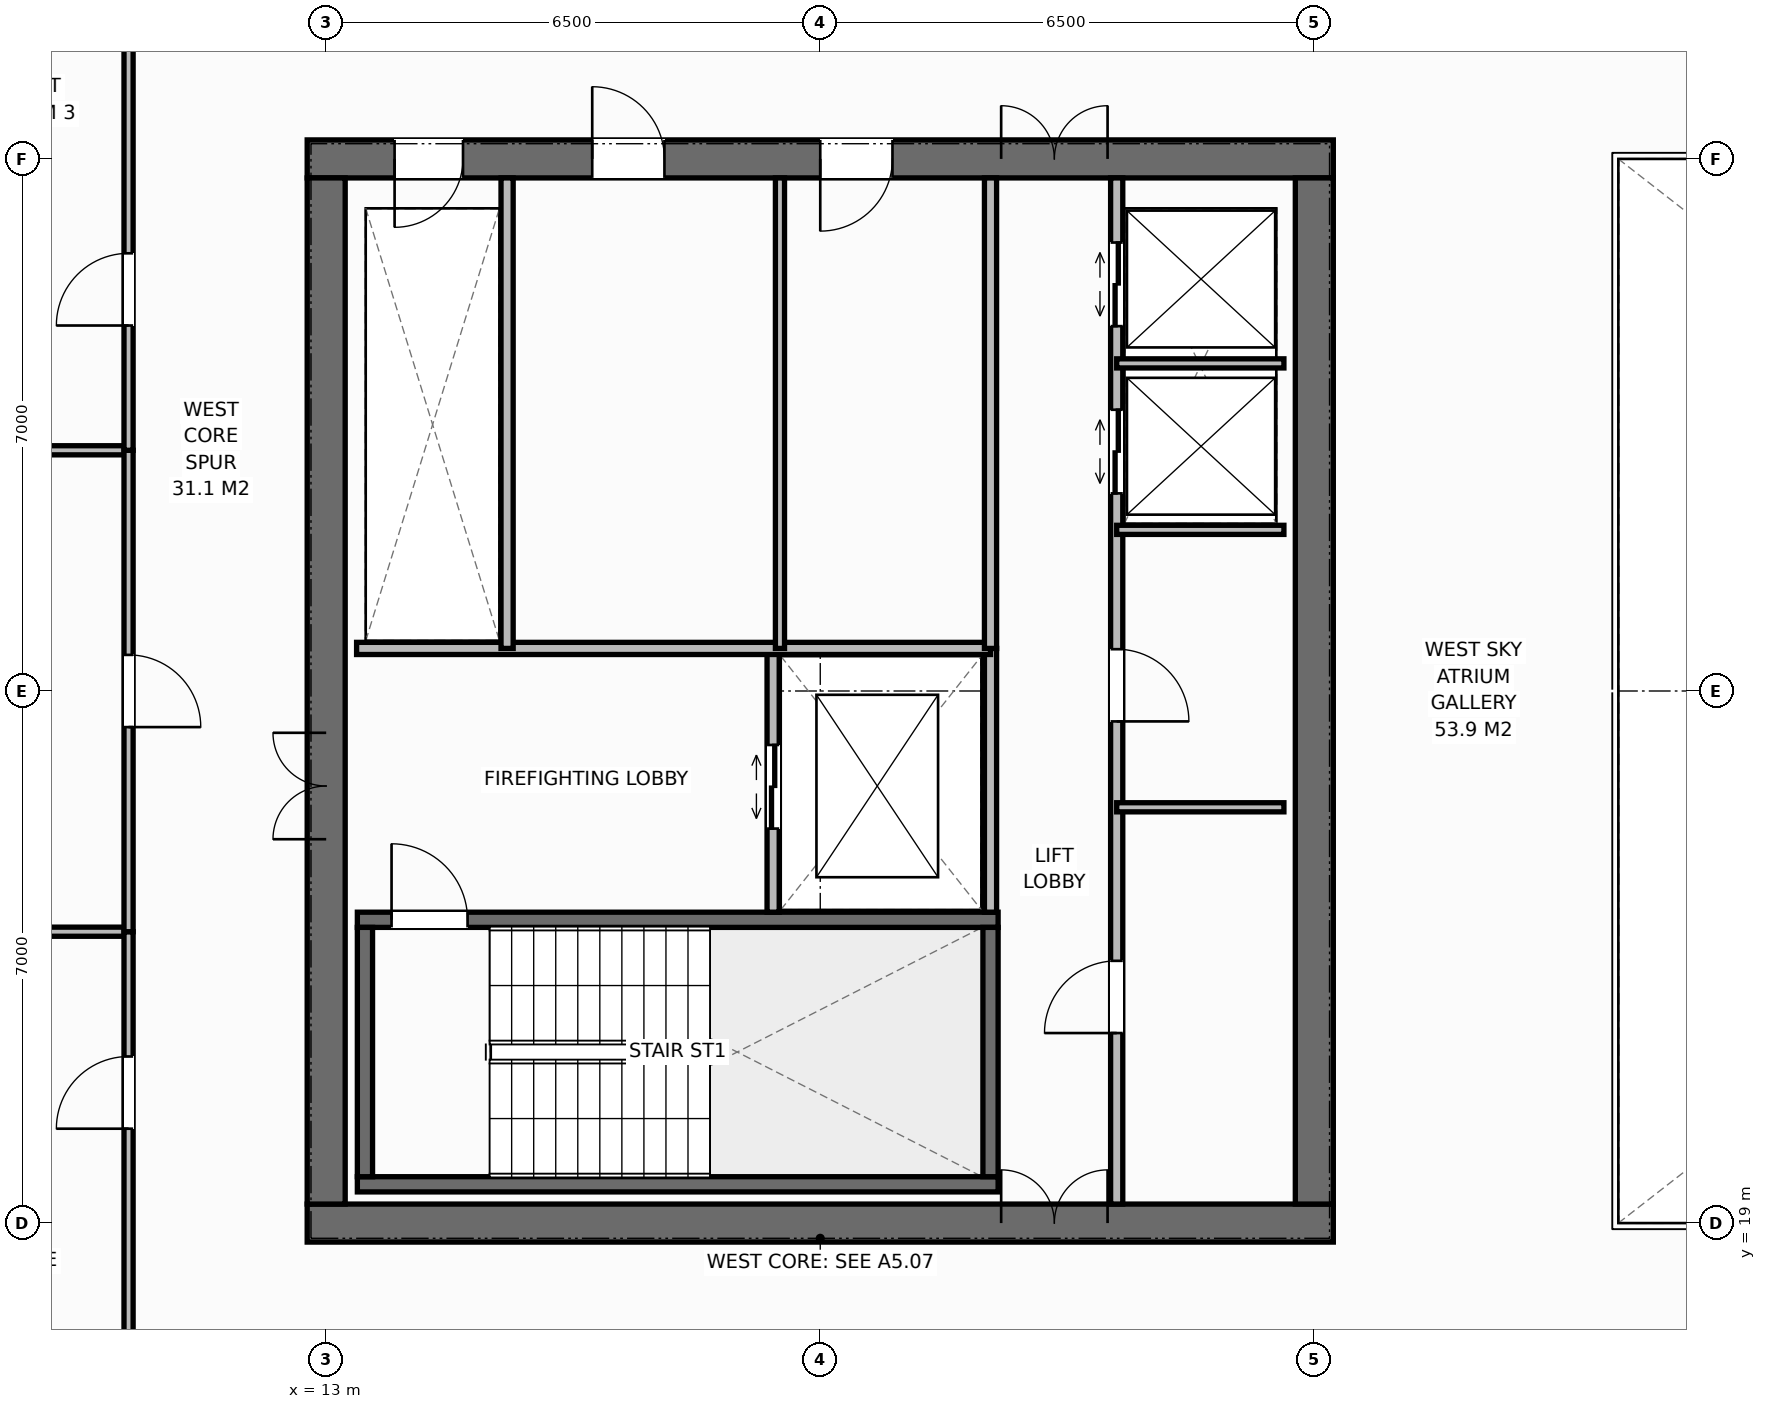
"""IFC4 building model, lengths in metres.
Left out: names, types, materials, properties, quantities, classifications, styles, units other than length and angle.
Written with IfcOpenShell. Run it as: python <this file> out.ifc"""

import sys

from ifc_helpers import new_model, si_unit, direction, frame, frame_2d, origin, place, context, subcontext, project, spatial, rectangle, extrude, element, fill, save


model = new_model("IFC4")
c1 = context("Model", 3, precision=1e-05, world=origin(), true_north=direction((0.0, 1.0)))
c2 = subcontext(c1, "Body", "Model", "MODEL_VIEW")
j1 = project(units=[si_unit("LENGTHUNIT", "METRE"), si_unit("PLANEANGLEUNIT", "RADIAN")], contexts=[c1])
p1 = place(None, origin())
s1 = spatial("IfcSite", under=j1, at=p1, CompositionType="ELEMENT")
p2 = place(p1, origin())
s2 = spatial("IfcBuilding", under=s1, at=p2, CompositionType="ELEMENT")
p3 = place(p2, frame((0.0, 0.0, 229.0)))
s3 = spatial("IfcBuildingStorey", under=s2, at=p3, CompositionType="ELEMENT", Elevation=229.0)
p4 = place(p3, frame((12.75, 19.0, 0.0), z_axis=(0.0, 0.0, 1.0), x_axis=(1.0, 0.0, 0.0)))
e1 = element("IfcWall", 1, at=p4, inside=s3, PredefinedType="SHEAR", context=c2, shape_type="SweptSolid", body=[
    extrude(rectangle(XDim=13.5, YDim=0.5, at=frame_2d((6.75, 0.0))), origin(), (0.0, 0.0, 1.0), 3.8),
])
p5 = place(p4, frame((9.13, 0.0, 0.0)))
e2 = element("IfcOpeningElement", 2, at=p5, cuts=e1, PredefinedType="OPENING", context=c2, shape_type="SweptSolid", body=[
    extrude(rectangle(XDim=1.4, YDim=2.2, at=frame_2d((0.7, 1.1))), frame((0.0, 0.26, 0.0), z_axis=(0.0, -1.0, 0.0), x_axis=(1.0, 0.0, 0.0)), (0.0, 0.0, 1.0), 0.52),
])
p6 = place(p3, frame((12.75, 33.0, 0.0), z_axis=(0.0, 0.0, 1.0), x_axis=(1.0, 0.0, 0.0)))
e3 = element("IfcWall", 3, at=p6, inside=s3, PredefinedType="SHEAR", context=c2, shape_type="SweptSolid", body=[
    extrude(rectangle(XDim=13.5, YDim=0.5, at=frame_2d((6.75, 0.0))), origin(), (0.0, 0.0, 1.0), 3.8),
])
p7 = place(p6, frame((1.15, 0.0, 0.0)))
e4 = element("IfcOpeningElement", 4, at=p7, cuts=e3, PredefinedType="OPENING", context=c2, shape_type="SweptSolid", body=[
    extrude(rectangle(XDim=0.9, YDim=2.15, at=frame_2d((0.45, 1.075))), frame((0.0, 0.26, 0.0), z_axis=(0.0, -1.0, 0.0), x_axis=(1.0, 0.0, 0.0)), (0.0, 0.0, 1.0), 0.52),
])
p8 = place(p6, frame((3.75, 0.0, 0.0)))
e5 = element("IfcOpeningElement", 5, at=p8, cuts=e3, PredefinedType="OPENING", context=c2, shape_type="SweptSolid", body=[
    extrude(rectangle(XDim=0.95, YDim=2.15, at=frame_2d((0.475, 1.075))), frame((0.0, 0.26, 0.0), z_axis=(0.0, -1.0, 0.0), x_axis=(1.0, 0.0, 0.0)), (0.0, 0.0, 1.0), 0.52),
])
p9 = place(p6, frame((6.75, 0.0, 0.0)))
e6 = element("IfcOpeningElement", 6, at=p9, cuts=e3, PredefinedType="OPENING", context=c2, shape_type="SweptSolid", body=[
    extrude(rectangle(XDim=0.95, YDim=2.15, at=frame_2d((0.475, 1.075))), frame((0.0, 0.26, 0.0), z_axis=(0.0, -1.0, 0.0), x_axis=(1.0, 0.0, 0.0)), (0.0, 0.0, 1.0), 0.52),
])
p10 = place(p6, frame((9.13, 0.0, 0.0)))
e7 = element("IfcOpeningElement", 7, at=p10, cuts=e3, PredefinedType="OPENING", context=c2, shape_type="SweptSolid", body=[
    extrude(rectangle(XDim=1.4, YDim=2.2, at=frame_2d((0.7, 1.1))), frame((0.0, 0.26, 0.0), z_axis=(0.0, -1.0, 0.0), x_axis=(1.0, 0.0, 0.0)), (0.0, 0.0, 1.0), 0.52),
])
p11 = place(p3, frame((13.0, 19.25, 0.0), z_axis=(0.0, 0.0, 1.0), x_axis=(0.0, 1.0, 0.0)))
e8 = element("IfcWall", 8, at=p11, inside=s3, PredefinedType="SHEAR", context=c2, shape_type="SweptSolid", body=[
    extrude(rectangle(XDim=13.5, YDim=0.5, at=frame_2d((6.75, 0.0))), origin(), (0.0, 0.0, 1.0), 3.8),
])
p12 = place(p11, frame((4.8, 0.0, 0.0)))
e9 = element("IfcOpeningElement", 9, at=p12, cuts=e8, PredefinedType="OPENING", context=c2, shape_type="SweptSolid", body=[
    extrude(rectangle(XDim=1.4, YDim=2.2, at=frame_2d((0.7, 1.1))), frame((0.0, 0.26, 0.0), z_axis=(0.0, -1.0, 0.0), x_axis=(1.0, 0.0, 0.0)), (0.0, 0.0, 1.0), 0.52),
])
p13 = place(p3, frame((26.0, 19.25, 0.0), z_axis=(0.0, 0.0, 1.0), x_axis=(0.0, 1.0, 0.0)))
e10 = element("IfcWall", 10, at=p13, inside=s3, PredefinedType="SHEAR", context=c2, shape_type="SweptSolid", body=[
    extrude(rectangle(XDim=13.5, YDim=0.5, at=frame_2d((6.75, 0.0))), origin(), (0.0, 0.0, 1.0), 3.8),
])
p14 = place(p3, frame((13.41, 19.51, 0.0), z_axis=(0.0, 0.0, 1.0), x_axis=(1.0, 0.0, 0.0)))
e11 = element("IfcWall", 11, at=p14, inside=s3, PredefinedType="SHEAR", context=c2, shape_type="SweptSolid", body=[
    extrude(rectangle(XDim=8.43, YDim=0.2, at=frame_2d((4.215, 0.0))), origin(), (0.0, 0.0, 1.0), 3.8),
])
p15 = place(p3, frame((13.41, 22.99, 0.0), z_axis=(0.0, 0.0, 1.0), x_axis=(1.0, 0.0, 0.0)))
e12 = element("IfcWall", 12, at=p15, inside=s3, PredefinedType="SHEAR", context=c2, shape_type="SweptSolid", body=[
    extrude(rectangle(XDim=8.43, YDim=0.2, at=frame_2d((4.215, 0.0))), origin(), (0.0, 0.0, 1.0), 3.8),
])
p16 = place(p15, frame((0.45, 0.0, 0.0)))
e13 = element("IfcOpeningElement", 13, at=p16, cuts=e12, PredefinedType="OPENING", context=c2, shape_type="SweptSolid", body=[
    extrude(rectangle(XDim=1.0, YDim=2.15, at=frame_2d((0.5, 1.075))), frame((0.0, 0.11, 0.0), z_axis=(0.0, -1.0, 0.0), x_axis=(1.0, 0.0, 0.0)), (0.0, 0.0, 1.0), 0.22),
])
for number, where, z_axis, x_axis in (
    (14, (13.51, 19.61, 0.0), (0.0, 0.0, 1.0), (0.0, 1.0, 0.0)),
    (15, (21.74, 19.61, 0.0), (0.0, 0.0, 1.0), (0.0, 1.0, 0.0)),
):
    element("IfcWall", number, at=place(p3, frame(where, z_axis=z_axis, x_axis=x_axis)), inside=s3, PredefinedType="SHEAR", context=c2, shape_type="SweptSolid", body=[
        extrude(rectangle(XDim=3.28, YDim=0.2, at=frame_2d((1.64, 0.0))), origin(), (0.0, 0.0, 1.0), 3.8),
    ])
p17 = place(p3, frame((21.74, 23.09, 0.0), z_axis=(0.0, 0.0, 1.0), x_axis=(0.0, 1.0, 0.0)))
e16 = element("IfcWall", 16, at=p17, inside=s3, PredefinedType="STANDARD", context=c2, shape_type="SweptSolid", body=[
    extrude(rectangle(XDim=3.47, YDim=0.16, at=frame_2d((1.735, 0.0))), origin(), (0.0, 0.0, 1.0), 3.58),
])
p18 = place(p3, frame((18.88, 23.09, 0.0), z_axis=(0.0, 0.0, 1.0), x_axis=(0.0, 1.0, 0.0)))
e17 = element("IfcWall", 17, at=p18, inside=s3, PredefinedType="STANDARD", context=c2, shape_type="SweptSolid", body=[
    extrude(rectangle(XDim=3.47, YDim=0.16, at=frame_2d((1.735, 0.0))), origin(), (0.0, 0.0, 1.0), 3.58),
])
p19 = place(p18, frame((1.1, 0.0, 0.0)))
e18 = element("IfcOpeningElement", 18, at=p19, cuts=e17, PredefinedType="OPENING", context=c2, shape_type="SweptSolid", body=[
    extrude(rectangle(XDim=1.1, YDim=2.2, at=frame_2d((0.55, 1.1))), frame((0.0, 0.09, 0.0), z_axis=(0.0, -1.0, 0.0), x_axis=(1.0, 0.0, 0.0)), (0.0, 0.0, 1.0), 0.18),
])
p20 = place(p3, frame((13.4, 26.56, 0.0), z_axis=(0.0, 0.0, 1.0), x_axis=(1.0, 0.0, 0.0)))
e19 = element("IfcWall", 19, at=p20, inside=s3, PredefinedType="STANDARD", context=c2, shape_type="SweptSolid", body=[
    extrude(rectangle(XDim=8.34, YDim=0.16, at=frame_2d((4.17, 0.0))), origin(), (0.0, 0.0, 1.0), 3.58),
])
p21 = place(p3, frame((15.38, 26.56, 0.0), z_axis=(0.0, 0.0, 1.0), x_axis=(0.0, 1.0, 0.0)))
e20 = element("IfcWall", 20, at=p21, inside=s3, PredefinedType="STANDARD", context=c2, shape_type="SweptSolid", body=[
    extrude(rectangle(XDim=6.19, YDim=0.16, at=frame_2d((3.095, 0.0))), origin(), (0.0, 0.0, 1.0), 3.58),
])
p22 = place(p3, frame((18.97, 26.56, 0.0), z_axis=(0.0, 0.0, 1.0), x_axis=(0.0, 1.0, 0.0)))
e21 = element("IfcWall", 21, at=p22, inside=s3, PredefinedType="PARTITIONING", context=c2, shape_type="SweptSolid", body=[
    extrude(rectangle(XDim=6.19, YDim=0.12, at=frame_2d((3.095, 0.0))), origin(), (0.0, 0.0, 1.0), 3.58),
])
p23 = place(p3, frame((21.74, 26.56, 0.0), z_axis=(0.0, 0.0, 1.0), x_axis=(0.0, 1.0, 0.0)))
e22 = element("IfcWall", 22, at=p23, inside=s3, PredefinedType="STANDARD", context=c2, shape_type="SweptSolid", body=[
    extrude(rectangle(XDim=6.19, YDim=0.16, at=frame_2d((3.095, 0.0))), origin(), (0.0, 0.0, 1.0), 3.58),
])
p24 = place(p3, frame((23.4, 19.25, 0.0), z_axis=(0.0, 0.0, 1.0), x_axis=(0.0, 1.0, 0.0)))
e23 = element("IfcWall", 23, at=p24, inside=s3, PredefinedType="STANDARD", context=c2, shape_type="SweptSolid", body=[
    extrude(rectangle(XDim=13.5, YDim=0.16, at=frame_2d((6.75, 0.0))), origin(), (0.0, 0.0, 1.0), 3.58),
])
p25 = place(p24, frame((2.25, 0.0, 0.0)))
e24 = element("IfcOpeningElement", 24, at=p25, cuts=e23, PredefinedType="OPENING", context=c2, shape_type="SweptSolid", body=[
    extrude(rectangle(XDim=0.95, YDim=2.15, at=frame_2d((0.475, 1.075))), frame((0.0, 0.09, 0.0), z_axis=(0.0, -1.0, 0.0), x_axis=(1.0, 0.0, 0.0)), (0.0, 0.0, 1.0), 0.18),
])
p26 = place(p24, frame((6.35, 0.0, 0.0)))
e25 = element("IfcOpeningElement", 25, at=p26, cuts=e23, PredefinedType="OPENING", context=c2, shape_type="SweptSolid", body=[
    extrude(rectangle(XDim=0.95, YDim=2.15, at=frame_2d((0.475, 1.075))), frame((0.0, 0.09, 0.0), z_axis=(0.0, -1.0, 0.0), x_axis=(1.0, 0.0, 0.0)), (0.0, 0.0, 1.0), 0.18),
])
p27 = place(p24, frame((9.35, 0.0, 0.0)))
e26 = element("IfcOpeningElement", 26, at=p27, cuts=e23, PredefinedType="OPENING", context=c2, shape_type="SweptSolid", body=[
    extrude(rectangle(XDim=1.1, YDim=2.2, at=frame_2d((0.55, 1.1))), frame((0.0, 0.09, 0.0), z_axis=(0.0, -1.0, 0.0), x_axis=(1.0, 0.0, 0.0)), (0.0, 0.0, 1.0), 0.18),
])
p28 = place(p24, frame((11.55, 0.0, 0.0)))
e27 = element("IfcOpeningElement", 27, at=p28, cuts=e23, PredefinedType="OPENING", context=c2, shape_type="SweptSolid", body=[
    extrude(rectangle(XDim=1.1, YDim=2.2, at=frame_2d((0.55, 1.1))), frame((0.0, 0.09, 0.0), z_axis=(0.0, -1.0, 0.0), x_axis=(1.0, 0.0, 0.0)), (0.0, 0.0, 1.0), 0.18),
])
for number, where, z_axis, x_axis in (
    (28, (23.4, 24.47, 0.0), (0.0, 0.0, 1.0), (1.0, 0.0, 0.0)),
    (29, (23.4, 28.12, 0.0), (0.0, 0.0, 1.0), (1.0, 0.0, 0.0)),
    (30, (23.4, 30.31, 0.0), (0.0, 0.0, 1.0), (1.0, 0.0, 0.0)),
):
    element("IfcWall", number, at=place(p3, frame(where, z_axis=z_axis, x_axis=x_axis)), inside=s3, PredefinedType="PARTITIONING", context=c2, shape_type="SweptSolid", body=[
        extrude(rectangle(XDim=2.2, YDim=0.12, at=frame_2d((1.1, 0.0))), origin(), (0.0, 0.0, 1.0), 3.58),
    ])
p29 = place(p3, frame((5.82, 22.833, 0.0), z_axis=(0.0, 0.0, 1.0), x_axis=(1.0, 0.0, 0.0)))
e31 = element("IfcWall", 31, at=p29, inside=s3, PredefinedType="PARTITIONING", context=c2, shape_type="SweptSolid", body=[
    extrude(rectangle(XDim=4.58, YDim=0.12, at=frame_2d((2.29, 0.0))), origin(), (0.0, 0.0, 1.0), 3.58),
])
p30 = place(p3, frame((10.4, 16.5, 0.0), z_axis=(0.0, 0.0, 1.0), x_axis=(0.0, 1.0, 0.0)))
e32 = element("IfcWall", 32, at=p30, inside=s3, PredefinedType="PARTITIONING", context=c2, shape_type="SweptSolid", body=[
    extrude(rectangle(XDim=6.333, YDim=0.12, at=frame_2d((3.167, 0.0))), origin(), (0.0, 0.0, 1.0), 3.58),
])
p31 = place(p30, frame((3.742, 0.0, 0.0)))
e33 = element("IfcOpeningElement", 33, at=p31, cuts=e32, PredefinedType="OPENING", context=c2, shape_type="SweptSolid", body=[
    extrude(rectangle(XDim=0.95, YDim=2.15, at=frame_2d((0.475, 1.075))), frame((0.0, 0.07, 0.0), z_axis=(0.0, -1.0, 0.0), x_axis=(1.0, 0.0, 0.0)), (0.0, 0.0, 1.0), 0.14),
])
p32 = place(p3, frame((5.82, 29.167, 0.0), z_axis=(0.0, 0.0, 1.0), x_axis=(1.0, 0.0, 0.0)))
e34 = element("IfcWall", 34, at=p32, inside=s3, PredefinedType="PARTITIONING", context=c2, shape_type="SweptSolid", body=[
    extrude(rectangle(XDim=4.58, YDim=0.12, at=frame_2d((2.29, 0.0))), origin(), (0.0, 0.0, 1.0), 3.58),
])
p33 = place(p3, frame((10.4, 22.833, 0.0), z_axis=(0.0, 0.0, 1.0), x_axis=(0.0, 1.0, 0.0)))
e35 = element("IfcWall", 35, at=p33, inside=s3, PredefinedType="PARTITIONING", context=c2, shape_type="SweptSolid", body=[
    extrude(rectangle(XDim=6.333, YDim=0.12, at=frame_2d((3.167, 0.0))), origin(), (0.0, 0.0, 1.0), 3.58),
])
p34 = place(p33, frame((2.692, 0.0, 0.0)))
e36 = element("IfcOpeningElement", 36, at=p34, cuts=e35, PredefinedType="OPENING", context=c2, shape_type="SweptSolid", body=[
    extrude(rectangle(XDim=0.95, YDim=2.15, at=frame_2d((0.475, 1.075))), frame((0.0, 0.07, 0.0), z_axis=(0.0, -1.0, 0.0), x_axis=(1.0, 0.0, 0.0)), (0.0, 0.0, 1.0), 0.14),
])
p35 = place(p3, frame((10.4, 29.167, 0.0), z_axis=(0.0, 0.0, 1.0), x_axis=(0.0, 1.0, 0.0)))
e37 = element("IfcWall", 37, at=p35, inside=s3, PredefinedType="PARTITIONING", context=c2, shape_type="SweptSolid", body=[
    extrude(rectangle(XDim=6.333, YDim=0.12, at=frame_2d((3.167, 0.0))), origin(), (0.0, 0.0, 1.0), 3.58),
])
p36 = place(p35, frame((1.642, 0.0, 0.0)))
e38 = element("IfcOpeningElement", 38, at=p36, cuts=e37, PredefinedType="OPENING", context=c2, shape_type="SweptSolid", body=[
    extrude(rectangle(XDim=0.95, YDim=2.15, at=frame_2d((0.475, 1.075))), frame((0.0, 0.07, 0.0), z_axis=(0.0, -1.0, 0.0), x_axis=(1.0, 0.0, 0.0)), (0.0, 0.0, 1.0), 0.14),
])
p37 = place(p16, origin())
e39 = element("IfcDoor", 39, at=p37, inside=s3, OperationType="SINGLE_SWING_LEFT", PredefinedType="DOOR", context=c2, shape_type="SweptSolid", body=[
    extrude(rectangle(XDim=1.0, YDim=2.15, at=frame_2d((0.5, 1.075))), frame((0.0, 0.025, 0.0), z_axis=(0.0, -1.0, 0.0), x_axis=(1.0, 0.0, 0.0)), (0.0, 0.0, 1.0), 0.05),
])
fill(e13, e39)
p38 = place(p12, origin())
e40 = element("IfcDoor", 40, at=p38, inside=s3, OperationType="DOUBLE_DOOR_SINGLE_SWING", PredefinedType="DOOR", context=c2, shape_type="SweptSolid", body=[
    extrude(rectangle(XDim=1.4, YDim=2.2, at=frame_2d((0.7, 1.1))), frame((0.0, 0.025, 0.0), z_axis=(0.0, -1.0, 0.0), x_axis=(1.0, 0.0, 0.0)), (0.0, 0.0, 1.0), 0.05),
])
fill(e9, e40)
p39 = place(p19, origin())
e41 = element("IfcDoor", 41, at=p39, inside=s3, OperationType="DOUBLE_DOOR_SLIDING", PredefinedType="DOOR", context=c2, shape_type="SweptSolid", body=[
    extrude(rectangle(XDim=1.1, YDim=2.2, at=frame_2d((0.55, 1.1))), frame((0.0, 0.025, 0.0), z_axis=(0.0, -1.0, 0.0), x_axis=(1.0, 0.0, 0.0)), (0.0, 0.0, 1.0), 0.05),
])
fill(e18, e41)
p40 = place(p7, origin())
e42 = element("IfcDoor", 42, at=p40, inside=s3, OperationType="SINGLE_SWING_RIGHT", PredefinedType="DOOR", context=c2, shape_type="SweptSolid", body=[
    extrude(rectangle(XDim=0.9, YDim=2.15, at=frame_2d((0.45, 1.075))), frame((0.0, -0.025, 0.0), z_axis=(0.0, -1.0, 0.0), x_axis=(1.0, 0.0, 0.0)), (0.0, 0.0, 1.0), 0.05),
])
fill(e4, e42)
p41 = place(p8, origin())
e43 = element("IfcDoor", 43, at=p41, inside=s3, OperationType="SINGLE_SWING_LEFT", PredefinedType="DOOR", context=c2, shape_type="SweptSolid", body=[
    extrude(rectangle(XDim=0.95, YDim=2.15, at=frame_2d((0.475, 1.075))), frame((0.0, -0.025, 0.0), z_axis=(0.0, -1.0, 0.0), x_axis=(1.0, 0.0, 0.0)), (0.0, 0.0, 1.0), 0.05),
])
fill(e5, e43)
p42 = place(p9, origin())
e44 = element("IfcDoor", 44, at=p42, inside=s3, OperationType="SINGLE_SWING_RIGHT", PredefinedType="DOOR", context=c2, shape_type="SweptSolid", body=[
    extrude(rectangle(XDim=0.95, YDim=2.15, at=frame_2d((0.475, 1.075))), frame((0.0, -0.025, 0.0), z_axis=(0.0, -1.0, 0.0), x_axis=(1.0, 0.0, 0.0)), (0.0, 0.0, 1.0), 0.05),
])
fill(e6, e44)
p43 = place(p5, origin())
e45 = element("IfcDoor", 45, at=p43, inside=s3, OperationType="DOUBLE_DOOR_SINGLE_SWING", PredefinedType="DOOR", context=c2, shape_type="SweptSolid", body=[
    extrude(rectangle(XDim=1.4, YDim=2.2, at=frame_2d((0.7, 1.1))), frame((0.0, 0.075, 0.0), z_axis=(0.0, -1.0, 0.0), x_axis=(1.0, 0.0, 0.0)), (0.0, 0.0, 1.0), 0.05),
])
fill(e2, e45)
p44 = place(p10, origin())
e46 = element("IfcDoor", 46, at=p44, inside=s3, OperationType="DOUBLE_DOOR_SINGLE_SWING", PredefinedType="DOOR", context=c2, shape_type="SweptSolid", body=[
    extrude(rectangle(XDim=1.4, YDim=2.2, at=frame_2d((0.7, 1.1))), frame((0.0, -0.025, 0.0), z_axis=(0.0, -1.0, 0.0), x_axis=(1.0, 0.0, 0.0)), (0.0, 0.0, 1.0), 0.05),
])
fill(e7, e46)
p45 = place(p25, origin())
e47 = element("IfcDoor", 47, at=p45, inside=s3, OperationType="SINGLE_SWING_LEFT", PredefinedType="DOOR", context=c2, shape_type="SweptSolid", body=[
    extrude(rectangle(XDim=0.95, YDim=2.15, at=frame_2d((0.475, 1.075))), frame((0.0, 0.025, 0.0), z_axis=(0.0, -1.0, 0.0), x_axis=(1.0, 0.0, 0.0)), (0.0, 0.0, 1.0), 0.05),
])
fill(e24, e47)
p46 = place(p26, origin())
e48 = element("IfcDoor", 48, at=p46, inside=s3, OperationType="SINGLE_SWING_RIGHT", PredefinedType="DOOR", context=c2, shape_type="SweptSolid", body=[
    extrude(rectangle(XDim=0.95, YDim=2.15, at=frame_2d((0.475, 1.075))), frame((0.0, 0.025, 0.0), z_axis=(0.0, -1.0, 0.0), x_axis=(1.0, 0.0, 0.0)), (0.0, 0.0, 1.0), 0.05),
])
fill(e25, e48)
p47 = place(p27, origin())
e49 = element("IfcDoor", 49, at=p47, inside=s3, OperationType="DOUBLE_DOOR_SLIDING", PredefinedType="DOOR", context=c2, shape_type="SweptSolid", body=[
    extrude(rectangle(XDim=1.1, YDim=2.2, at=frame_2d((0.55, 1.1))), frame((0.0, 0.025, 0.0), z_axis=(0.0, -1.0, 0.0), x_axis=(1.0, 0.0, 0.0)), (0.0, 0.0, 1.0), 0.05),
])
fill(e26, e49)
p48 = place(p28, origin())
e50 = element("IfcDoor", 50, at=p48, inside=s3, OperationType="DOUBLE_DOOR_SLIDING", PredefinedType="DOOR", context=c2, shape_type="SweptSolid", body=[
    extrude(rectangle(XDim=1.1, YDim=2.2, at=frame_2d((0.55, 1.1))), frame((0.0, 0.025, 0.0), z_axis=(0.0, -1.0, 0.0), x_axis=(1.0, 0.0, 0.0)), (0.0, 0.0, 1.0), 0.05),
])
fill(e27, e50)
p49 = place(p31, origin())
e51 = element("IfcDoor", 51, at=p49, inside=s3, OperationType="SINGLE_SWING_LEFT", PredefinedType="DOOR", context=c2, shape_type="SweptSolid", body=[
    extrude(rectangle(XDim=0.95, YDim=2.15, at=frame_2d((0.475, 1.075))), frame((0.0, 0.025, 0.0), z_axis=(0.0, -1.0, 0.0), x_axis=(1.0, 0.0, 0.0)), (0.0, 0.0, 1.0), 0.05),
])
fill(e33, e51)
p50 = place(p34, origin())
e52 = element("IfcDoor", 52, at=p50, inside=s3, OperationType="SINGLE_SWING_RIGHT", PredefinedType="DOOR", context=c2, shape_type="SweptSolid", body=[
    extrude(rectangle(XDim=0.95, YDim=2.15, at=frame_2d((0.475, 1.075))), frame((0.0, 0.025, 0.0), z_axis=(0.0, -1.0, 0.0), x_axis=(1.0, 0.0, 0.0)), (0.0, 0.0, 1.0), 0.05),
])
fill(e36, e52)
p51 = place(p36, origin())
e53 = element("IfcDoor", 53, at=p51, inside=s3, OperationType="SINGLE_SWING_LEFT", PredefinedType="DOOR", context=c2, shape_type="SweptSolid", body=[
    extrude(rectangle(XDim=0.95, YDim=2.15, at=frame_2d((0.475, 1.075))), frame((0.0, 0.025, 0.0), z_axis=(0.0, -1.0, 0.0), x_axis=(1.0, 0.0, 0.0)), (0.0, 0.0, 1.0), 0.05),
])
fill(e38, e53)
save(model, sys.argv[1])
